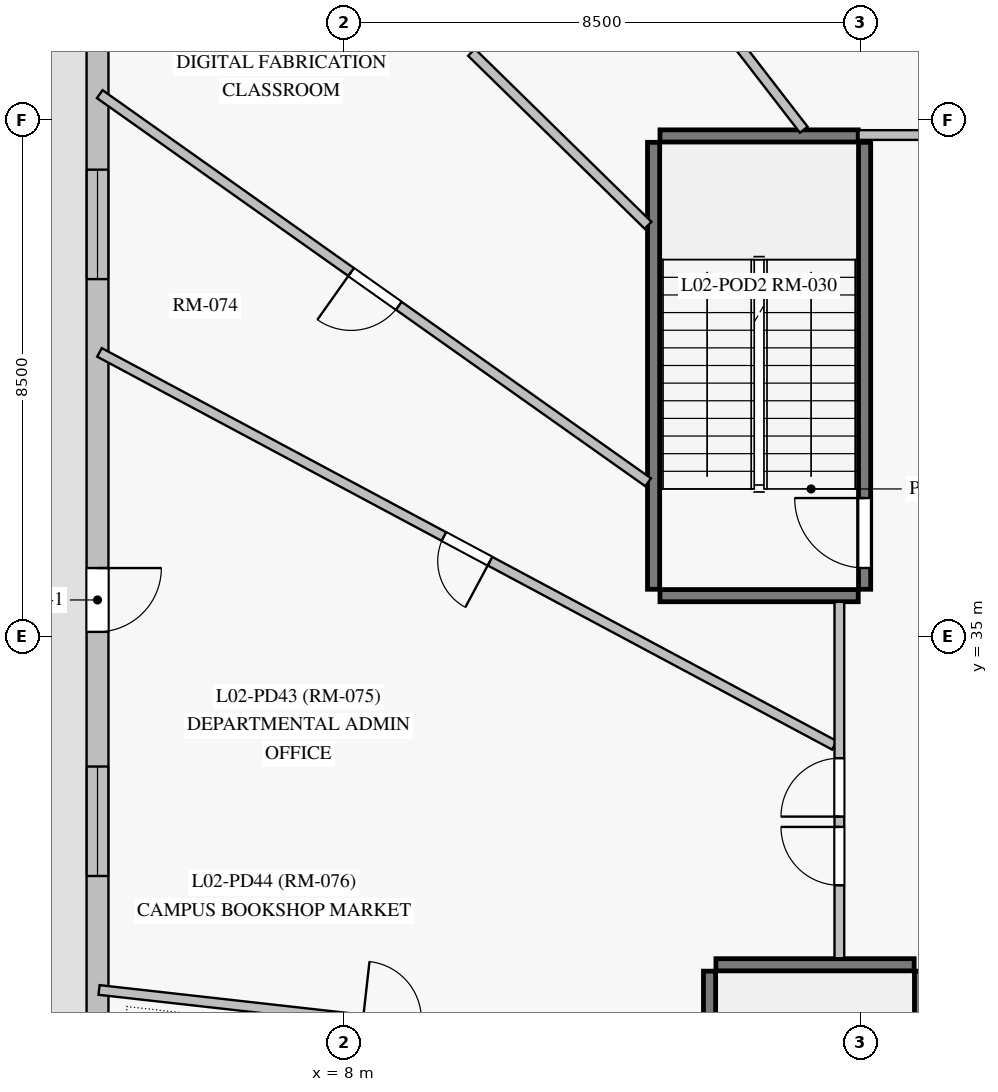
"""IFC4 building model, lengths in metres.
Left out: names, types, materials, properties, quantities, classifications, styles, units other than length and angle.
Written with IfcOpenShell. Run it as: python <this file> out.ifc"""

import sys

from ifc_helpers import new_model, si_unit, direction, frame, frame_2d, origin, origin_with_axes, place, context, subcontext, project, spatial, rectangle, extrude, source, transform, mapped, element, fill, save


model = new_model("IFC4")
c1 = context("Model", 3, precision=1e-05, world=origin(), true_north=direction((0.0, 1.0)))
c2 = subcontext(c1, "Body", "Model", "MODEL_VIEW")
j1 = project(units=[si_unit("LENGTHUNIT", "METRE"), si_unit("PLANEANGLEUNIT", "RADIAN")], contexts=[c1])
p1 = place(None, origin())
s1 = spatial("IfcSite", under=j1, at=p1, CompositionType="ELEMENT")
p2 = place(p1, origin())
s2 = spatial("IfcBuilding", under=s1, at=p2, CompositionType="ELEMENT")
p3 = place(p2, frame((0.0, 0.0, 9.0)))
s3 = spatial("IfcBuildingStorey", under=s2, at=p3, CompositionType="ELEMENT", Elevation=9.0)
p4 = place(p3, frame((3.95, 48.35, 0.0), z_axis=(0.0, 0.0, 1.0), x_axis=(0.0, -1.0, 0.0)))
e1 = element("IfcWall", 1, at=p4, inside=s3, PredefinedType="SOLIDWALL", context=c2, shape_type="SweptSolid", body=[
    extrude(rectangle(XDim=43.7, YDim=0.36, at=frame_2d((21.85, 0.0))), origin(), (0.0, 0.0, 1.0), 4.2),
])
p5 = place(p4, frame((1.439, 0.0, 0.85)))
e2 = element("IfcOpeningElement", 2, at=p5, cuts=e1, PredefinedType="OPENING", context=c2, shape_type="SweptSolid", body=[
    extrude(rectangle(XDim=1.8, YDim=2.2, at=frame_2d((0.9, 1.1))), frame((0.0, 0.19, 0.0), z_axis=(0.0, -1.0, 0.0), x_axis=(1.0, 0.0, 0.0)), (0.0, 0.0, 1.0), 0.38),
])
p6 = place(p4, frame((5.669, 0.0, 0.85)))
e3 = element("IfcOpeningElement", 3, at=p6, cuts=e1, PredefinedType="OPENING", context=c2, shape_type="SweptSolid", body=[
    extrude(rectangle(XDim=1.8, YDim=2.2, at=frame_2d((0.9, 1.1))), frame((0.0, 0.19, 0.0), z_axis=(0.0, -1.0, 0.0), x_axis=(1.0, 0.0, 0.0)), (0.0, 0.0, 1.0), 0.38),
])
p7 = place(p4, frame((15.485, 0.0, 0.85)))
e4 = element("IfcOpeningElement", 4, at=p7, cuts=e1, PredefinedType="OPENING", context=c2, shape_type="SweptSolid", body=[
    extrude(rectangle(XDim=1.8, YDim=2.2, at=frame_2d((0.9, 1.1))), frame((0.0, 0.19, 0.0), z_axis=(0.0, -1.0, 0.0), x_axis=(1.0, 0.0, 0.0)), (0.0, 0.0, 1.0), 0.38),
])
p8 = place(p4, frame((20.96, 0.0, 0.85)))
e5 = element("IfcOpeningElement", 5, at=p8, cuts=e1, PredefinedType="OPENING", context=c2, shape_type="SweptSolid", body=[
    extrude(rectangle(XDim=1.8, YDim=2.2, at=frame_2d((0.9, 1.1))), frame((0.0, 0.19, 0.0), z_axis=(0.0, -1.0, 0.0), x_axis=(1.0, 0.0, 0.0)), (0.0, 0.0, 1.0), 0.38),
])
p9 = place(p4, frame((28.012, 0.0, 0.85)))
e6 = element("IfcOpeningElement", 6, at=p9, cuts=e1, PredefinedType="OPENING", context=c2, shape_type="SweptSolid", body=[
    extrude(rectangle(XDim=1.8, YDim=2.2, at=frame_2d((0.9, 1.1))), frame((0.0, 0.19, 0.0), z_axis=(0.0, -1.0, 0.0), x_axis=(1.0, 0.0, 0.0)), (0.0, 0.0, 1.0), 0.38),
])
p10 = place(p4, frame((32.279, 0.0, 0.85)))
e7 = element("IfcOpeningElement", 7, at=p10, cuts=e1, PredefinedType="OPENING", context=c2, shape_type="SweptSolid", body=[
    extrude(rectangle(XDim=1.8, YDim=2.2, at=frame_2d((0.9, 1.1))), frame((0.0, 0.19, 0.0), z_axis=(0.0, -1.0, 0.0), x_axis=(1.0, 0.0, 0.0)), (0.0, 0.0, 1.0), 0.38),
])
p11 = place(p4, frame((37.578, 0.0, 0.85)))
e8 = element("IfcOpeningElement", 8, at=p11, cuts=e1, PredefinedType="OPENING", context=c2, shape_type="SweptSolid", body=[
    extrude(rectangle(XDim=1.8, YDim=2.2, at=frame_2d((0.9, 1.1))), frame((0.0, 0.19, 0.0), z_axis=(0.0, -1.0, 0.0), x_axis=(1.0, 0.0, 0.0)), (0.0, 0.0, 1.0), 0.38),
])
p12 = place(p4, frame((12.221, 0.0, 0.0)))
e9 = element("IfcOpeningElement", 9, at=p12, cuts=e1, PredefinedType="OPENING", context=c2, shape_type="SweptSolid", body=[
    extrude(rectangle(XDim=1.05, YDim=2.12, at=frame_2d((0.525, 1.06))), frame((0.0, 0.19, 0.0), z_axis=(0.0, -1.0, 0.0), x_axis=(1.0, 0.0, 0.0)), (0.0, 0.0, 1.0), 0.38),
])
p13 = place(p3, frame((14.015, 22.15, 0.0), z_axis=(0.0, 0.0, 1.0), x_axis=(0.0, 1.0, 0.0)))
e10 = element("IfcWall", 10, at=p13, inside=s3, PredefinedType="SHEAR", context=c2, shape_type="SweptSolid", body=[
    extrude(rectangle(XDim=7.35, YDim=0.2, at=frame_2d((3.675, 0.0))), origin(), (0.0, 0.0, 1.0), 4.2),
])
p14 = place(p3, frame((17.485, 22.15, 0.0), z_axis=(0.0, 0.0, 1.0), x_axis=(0.0, 1.0, 0.0)))
e11 = element("IfcWall", 11, at=p14, inside=s3, PredefinedType="SHEAR", context=c2, shape_type="SweptSolid", body=[
    extrude(rectangle(XDim=7.35, YDim=0.2, at=frame_2d((3.675, 0.0))), origin(), (0.0, 0.0, 1.0), 4.2),
])
p15 = place(p14, frame((0.35, 0.0, 0.0)))
e12 = element("IfcOpeningElement", 12, at=p15, cuts=e11, PredefinedType="OPENING", context=c2, shape_type="SweptSolid", body=[
    extrude(rectangle(XDim=1.15, YDim=2.15, at=frame_2d((0.575, 1.075))), frame((0.0, 0.11, 0.0), z_axis=(0.0, -1.0, 0.0), x_axis=(1.0, 0.0, 0.0)), (0.0, 0.0, 1.0), 0.22),
])
p16 = place(p3, frame((13.095, 35.78, 0.0), z_axis=(0.0, 0.0, 1.0), x_axis=(0.0, 1.0, 0.0)))
e13 = element("IfcWall", 13, at=p16, inside=s3, PredefinedType="SHEAR", context=c2, shape_type="SweptSolid", body=[
    extrude(rectangle(XDim=7.35, YDim=0.2, at=frame_2d((3.675, 0.0))), origin(), (0.0, 0.0, 1.0), 4.2),
])
p17 = place(p3, frame((16.565, 35.78, 0.0), z_axis=(0.0, 0.0, 1.0), x_axis=(0.0, 1.0, 0.0)))
e14 = element("IfcWall", 14, at=p17, inside=s3, PredefinedType="SHEAR", context=c2, shape_type="SweptSolid", body=[
    extrude(rectangle(XDim=7.35, YDim=0.2, at=frame_2d((3.675, 0.0))), origin(), (0.0, 0.0, 1.0), 4.2),
])
p18 = place(p17, frame((0.35, 0.0, 0.0)))
e15 = element("IfcOpeningElement", 15, at=p18, cuts=e14, PredefinedType="OPENING", context=c2, shape_type="SweptSolid", body=[
    extrude(rectangle(XDim=1.15, YDim=2.15, at=frame_2d((0.575, 1.075))), frame((0.0, 0.11, 0.0), z_axis=(0.0, -1.0, 0.0), x_axis=(1.0, 0.0, 0.0)), (0.0, 0.0, 1.0), 0.22),
])
for number, where, z_axis, x_axis in (
    (16, (13.2, 35.675, 0.0), (0.0, 0.0, 1.0), (1.0, 0.0, 0.0)),
    (17, (13.2, 43.235, 0.0), (0.0, 0.0, 1.0), (1.0, 0.0, 0.0)),
):
    element("IfcWall", number, at=place(p3, frame(where, z_axis=z_axis, x_axis=x_axis)), inside=s3, PredefinedType="SHEAR", context=c2, shape_type="SweptSolid", body=[
        extrude(rectangle(XDim=3.26, YDim=0.2, at=frame_2d((1.63, 0.0))), origin(), (0.0, 0.0, 1.0), 4.2),
    ])
p19 = place(p3, frame((14.12, 29.605, 0.0), z_axis=(0.0, 0.0, 1.0), x_axis=(1.0, 0.0, 0.0)))
e18 = element("IfcWall", 18, at=p19, inside=s3, PredefinedType="SHEAR", context=c2, shape_type="SweptSolid", body=[
    extrude(rectangle(XDim=3.26, YDim=0.2, at=frame_2d((1.63, 0.0))), origin(), (0.0, 0.0, 1.0), 4.2),
])
p20 = place(p3, frame((16.068, 33.214, 0.0), z_axis=(0.0, 0.0, 1.0), x_axis=(-0.881886972295, 0.471460887132, 0.0)))
e19 = element("IfcWall", 19, at=p20, inside=s3, PredefinedType="PARTITIONING", context=c2, shape_type="SweptSolid", body=[
    extrude(rectangle(XDim=13.704, YDim=0.16, at=frame_2d((6.852, 0.0))), origin(), (0.0, 0.0, 1.0), 4.2),
])
p21 = place(p20, frame((6.422, 0.0, 0.0)))
e20 = element("IfcOpeningElement", 20, at=p21, cuts=e19, PredefinedType="OPENING", context=c2, shape_type="SweptSolid", body=[
    extrude(rectangle(XDim=0.86, YDim=2.04, at=frame_2d((0.43, 1.02))), frame((0.0, 0.09, 0.0), z_axis=(0.0, -1.0, 0.0), x_axis=(1.0, 0.0, 0.0)), (0.0, 0.0, 1.0), 0.18),
])
p22 = place(p3, frame((13.005, 37.54, 0.0), z_axis=(0.0, 0.0, 1.0), x_axis=(-0.816255020813, 0.577691735269, 0.0)))
e21 = element("IfcWall", 21, at=p22, inside=s3, PredefinedType="PARTITIONING", context=c2, shape_type="SweptSolid", body=[
    extrude(rectangle(XDim=11.048, YDim=0.16, at=frame_2d((5.524, 0.0))), origin(), (0.0, 0.0, 1.0), 4.2),
])
p23 = place(p22, frame((5.024, 0.0, 0.0)))
e22 = element("IfcOpeningElement", 22, at=p23, cuts=e21, PredefinedType="OPENING", context=c2, shape_type="SweptSolid", body=[
    extrude(rectangle(XDim=0.96, YDim=2.15, at=frame_2d((0.48, 1.075))), frame((0.0, 0.09, 0.0), z_axis=(0.0, -1.0, 0.0), x_axis=(1.0, 0.0, 0.0)), (0.0, 0.0, 1.0), 0.18),
])
p24 = place(p3, frame((3.975, 29.191, 0.0), z_axis=(0.0, 0.0, 1.0), x_axis=(0.993764244895, -0.111501684152, 0.0)))
e23 = element("IfcWall", 23, at=p24, inside=s3, PredefinedType="PARTITIONING", context=c2, shape_type="SweptSolid", body=[
    extrude(rectangle(XDim=10.015, YDim=0.16, at=frame_2d((5.008, 0.0))), origin(), (0.0, 0.0, 1.0), 4.2),
])
p25 = place(p24, frame((4.367, 0.0, 0.0)))
e24 = element("IfcOpeningElement", 24, at=p25, cuts=e23, PredefinedType="OPENING", context=c2, shape_type="SweptSolid", body=[
    extrude(rectangle(XDim=0.96, YDim=2.15, at=frame_2d((0.48, 1.075))), frame((0.0, 0.09, 0.0), z_axis=(0.0, -1.0, 0.0), x_axis=(1.0, 0.0, 0.0)), (0.0, 0.0, 1.0), 0.18),
])
p26 = place(p3, frame((15.565, 43.337, 0.0), z_axis=(0.0, 0.0, 1.0), x_axis=(-0.611449226112, 0.791283668407, 0.0)))
e25 = element("IfcWall", 25, at=p26, inside=s3, PredefinedType="PARTITIONING", context=c2, shape_type="SweptSolid", body=[
    extrude(rectangle(XDim=8.056, YDim=0.16, at=frame_2d((4.028, 0.0))), origin(), (0.0, 0.0, 1.0), 4.2),
])
p27 = place(p26, frame((3.535, 0.0, 0.0)))
e26 = element("IfcOpeningElement", 26, at=p27, cuts=e25, PredefinedType="OPENING", context=c2, shape_type="SweptSolid", body=[
    extrude(rectangle(XDim=0.96, YDim=2.15, at=frame_2d((0.48, 1.075))), frame((0.0, 0.09, 0.0), z_axis=(0.0, -1.0, 0.0), x_axis=(1.0, 0.0, 0.0)), (0.0, 0.0, 1.0), 0.18),
])
p28 = place(p3, frame((18.979, 43.332, 0.0), z_axis=(0.0, 0.0, 1.0), x_axis=(-0.495000650274, 0.868892603391, 0.0)))
e27 = element("IfcWall", 27, at=p28, inside=s3, PredefinedType="PARTITIONING", context=c2, shape_type="SweptSolid", body=[
    extrude(rectangle(XDim=7.348, YDim=0.16, at=frame_2d((3.674, 0.0))), origin(), (0.0, 0.0, 1.0), 4.2),
])
p29 = place(p3, frame((16.15, 29.712, 0.0), z_axis=(0.0, 0.0, 1.0), x_axis=(0.0, 1.0, 0.0)))
e28 = element("IfcWall", 28, at=p29, inside=s3, PredefinedType="PARTITIONING", context=c2, shape_type="SweptSolid", body=[
    extrude(rectangle(XDim=5.861, YDim=0.16, at=frame_2d((2.93, 0.0))), origin(), (0.0, 0.0, 1.0), 4.2),
])
p30 = place(p29, frame((2.33, 0.0, 0.0)))
e29 = element("IfcOpeningElement", 29, at=p30, cuts=e28, PredefinedType="OPENING", context=c2, shape_type="SweptSolid", body=[
    extrude(rectangle(XDim=0.96, YDim=2.15, at=frame_2d((0.48, 1.075))), frame((0.0, 0.09, 0.0), z_axis=(0.0, -1.0, 0.0), x_axis=(1.0, 0.0, 0.0)), (0.0, 0.0, 1.0), 0.18),
])
p31 = place(p29, frame((1.2, 0.0, 0.0)))
e30 = element("IfcOpeningElement", 30, at=p31, cuts=e28, PredefinedType="OPENING", context=c2, shape_type="SweptSolid", body=[
    extrude(rectangle(XDim=0.96, YDim=2.15, at=frame_2d((0.48, 1.075))), frame((0.0, 0.09, 0.0), z_axis=(0.0, -1.0, 0.0), x_axis=(1.0, 0.0, 0.0)), (0.0, 0.0, 1.0), 0.18),
])
p32 = place(p3, frame((13.004, 41.766, 0.0), z_axis=(0.0, 0.0, 1.0), x_axis=(-0.714278297669, 0.699861781696, 0.0)))
e31 = element("IfcWall", 31, at=p32, inside=s3, PredefinedType="PARTITIONING", context=c2, shape_type="SweptSolid", body=[
    extrude(rectangle(XDim=4.064, YDim=0.16, at=frame_2d((2.032, 0.0))), origin(), (0.0, 0.0, 1.0), 4.2),
])
p33 = place(p3, frame((16.465, 43.25, 0.0), z_axis=(0.0, 0.0, 1.0), x_axis=(1.0, 0.0, 0.0)))
e32 = element("IfcWall", 32, at=p33, inside=s3, PredefinedType="PARTITIONING", context=c2, shape_type="SweptSolid", body=[
    extrude(rectangle(XDim=3.015, YDim=0.16, at=frame_2d((1.507, 0.0))), origin(), (0.0, 0.0, 1.0), 4.2),
])
p34 = place(p33, frame((1.035, 0.0, 0.0)))
e33 = element("IfcOpeningElement", 33, at=p34, cuts=e32, PredefinedType="OPENING", context=c2, shape_type="SweptSolid", body=[
    extrude(rectangle(XDim=0.96, YDim=2.15, at=frame_2d((0.48, 1.075))), frame((0.0, 0.09, 0.0), z_axis=(0.0, -1.0, 0.0), x_axis=(1.0, 0.0, 0.0)), (0.0, 0.0, 1.0), 0.18),
])
m1 = source(origin_with_axes(), c2, "Body", "SweptSolid", [
    extrude(rectangle(XDim=1.8, YDim=2.2, at=frame_2d((0.9, 1.1))), frame((0.0, 0.03, 0.0), z_axis=(0.0, -1.0, 0.0), x_axis=(1.0, 0.0, 0.0)), (0.0, 0.0, 1.0), 0.06),
])
p35 = place(p6, origin())
e34 = element("IfcWindow", 34, at=p35, inside=s3, PartitioningType="SINGLE_PANEL", PredefinedType="WINDOW", context=c2, shape_type="MappedRepresentation", body=[
    mapped(m1, transform((0.0, 0.0, 0.0), scale=1.0)),
])
fill(e3, e34)
p36 = place(p7, origin())
e35 = element("IfcWindow", 35, at=p36, inside=s3, PartitioningType="SINGLE_PANEL", PredefinedType="WINDOW", context=c2, shape_type="MappedRepresentation", body=[
    mapped(m1, transform((0.0, 0.0, 0.0), scale=1.0)),
])
fill(e4, e35)
m2 = source(origin_with_axes(), c2, "Body", "SweptSolid", [
    extrude(rectangle(XDim=1.05, YDim=2.12, at=frame_2d((0.525, 1.06))), frame((0.0, 0.025, 0.0), z_axis=(0.0, -1.0, 0.0), x_axis=(1.0, 0.0, 0.0)), (0.0, 0.0, 1.0), 0.05),
])
p37 = place(p12, origin())
e36 = element("IfcDoor", 36, at=p37, inside=s3, OperationType="SINGLE_SWING_LEFT", PredefinedType="DOOR", context=c2, shape_type="MappedRepresentation", body=[
    mapped(m2, transform((0.0, 0.0, 0.0), scale=1.0)),
])
fill(e9, e36)
m3 = source(origin_with_axes(), c2, "Body", "SweptSolid", [
    extrude(rectangle(XDim=1.15, YDim=2.15, at=frame_2d((0.575, 1.075))), frame((0.0, 0.025, 0.0), z_axis=(0.0, -1.0, 0.0), x_axis=(1.0, 0.0, 0.0)), (0.0, 0.0, 1.0), 0.05),
])
p38 = place(p18, origin())
e37 = element("IfcDoor", 37, at=p38, inside=s3, OperationType="SINGLE_SWING_RIGHT", PredefinedType="DOOR", context=c2, shape_type="MappedRepresentation", body=[
    mapped(m3, transform((0.0, 0.0, 0.0), scale=1.0)),
])
fill(e15, e37)
m4 = source(origin_with_axes(), c2, "Body", "SweptSolid", [
    extrude(rectangle(XDim=0.96, YDim=2.15, at=frame_2d((0.48, 1.075))), frame((0.0, 0.025, 0.0), z_axis=(0.0, -1.0, 0.0), x_axis=(1.0, 0.0, 0.0)), (0.0, 0.0, 1.0), 0.05),
])
p39 = place(p23, origin())
e38 = element("IfcDoor", 38, at=p39, inside=s3, OperationType="SINGLE_SWING_RIGHT", PredefinedType="DOOR", context=c2, shape_type="MappedRepresentation", body=[
    mapped(m4, transform((0.0, 0.0, 0.0), scale=1.0)),
])
fill(e22, e38)
p40 = place(p30, origin())
e39 = element("IfcDoor", 39, at=p40, inside=s3, OperationType="SINGLE_SWING_LEFT", PredefinedType="DOOR", context=c2, shape_type="MappedRepresentation", body=[
    mapped(m4, transform((0.0, 0.0, 0.0), scale=1.0)),
])
fill(e29, e39)
p41 = place(p31, origin())
e40 = element("IfcDoor", 40, at=p41, inside=s3, OperationType="SINGLE_SWING_RIGHT", PredefinedType="DOOR", context=c2, shape_type="MappedRepresentation", body=[
    mapped(m4, transform((0.0, 0.0, 0.0), scale=1.0)),
])
fill(e30, e40)
m5 = source(origin_with_axes(), c2, "Body", "SweptSolid", [
    extrude(rectangle(XDim=0.86, YDim=2.04, at=frame_2d((0.43, 1.02))), frame((0.0, 0.025, 0.0), z_axis=(0.0, -1.0, 0.0), x_axis=(1.0, 0.0, 0.0)), (0.0, 0.0, 1.0), 0.05),
])
p42 = place(p21, origin())
e41 = element("IfcDoor", 41, at=p42, inside=s3, OperationType="SINGLE_SWING_LEFT", PredefinedType="DOOR", context=c2, shape_type="MappedRepresentation", body=[
    mapped(m5, transform((0.0, 0.0, 0.0), scale=1.0)),
])
fill(e20, e41)
save(model, sys.argv[1])
